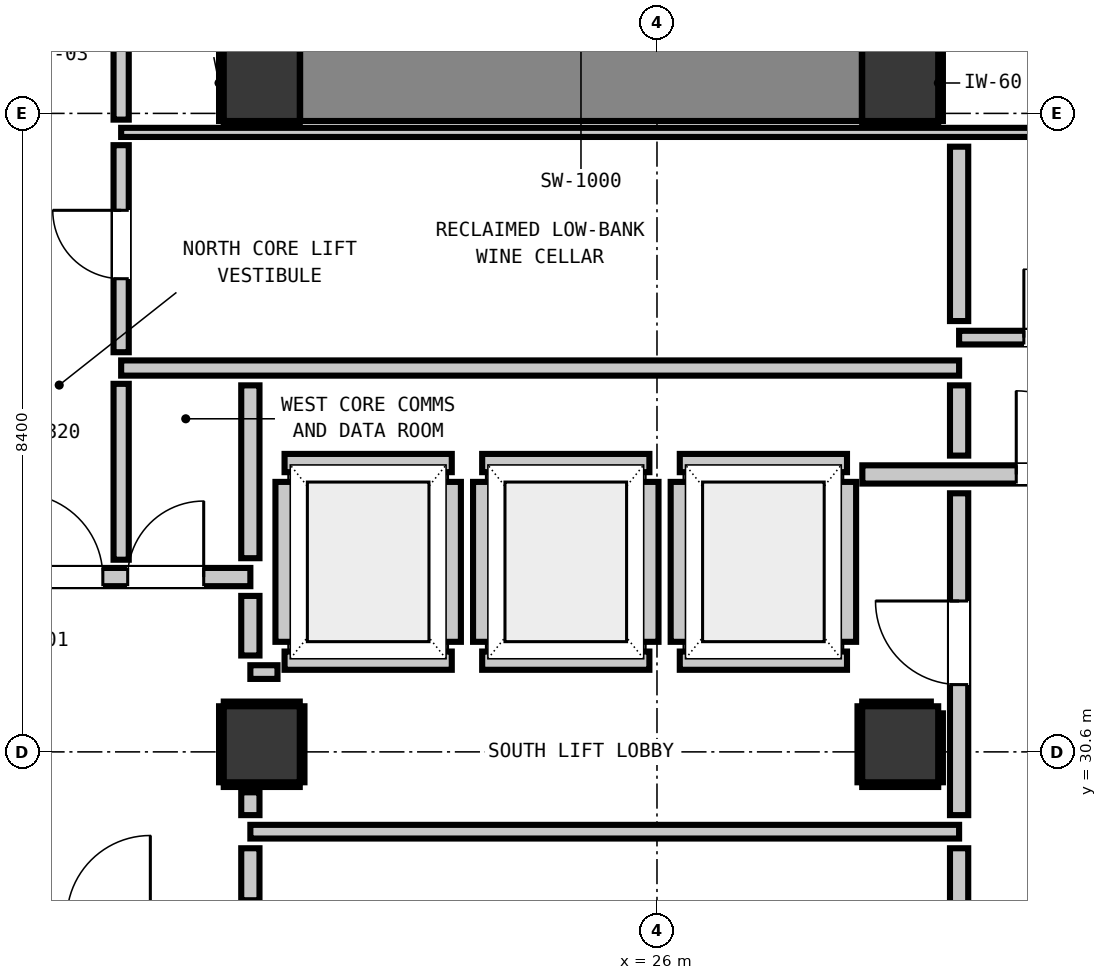
"""IFC4 building model, lengths in metres.
Left out: names, types, materials, properties, quantities, classifications, styles, units other than length and angle.
Written with IfcOpenShell. Run it as: python <this file> out.ifc"""

import sys

from ifc_helpers import new_model, si_unit, direction, frame, frame_2d, origin, origin_2d, place, context, subcontext, project, spatial, rectangle, extrude, element, fill, save


model = new_model("IFC4")
c1 = context("Model", 3, precision=1e-05, world=origin(), true_north=direction((0.0, 1.0)))
c2 = subcontext(c1, "Body", "Model", "MODEL_VIEW")
j1 = project(units=[si_unit("LENGTHUNIT", "METRE"), si_unit("PLANEANGLEUNIT", "RADIAN")], contexts=[c1])
p1 = place(None, origin())
s1 = spatial("IfcSite", under=j1, at=p1, CompositionType="ELEMENT")
p2 = place(p1, origin())
s2 = spatial("IfcBuilding", under=s1, at=p2, CompositionType="ELEMENT")
p3 = place(p2, frame((0.0, 0.0, 162.52)))
s3 = spatial("IfcBuildingStorey", under=s2, at=p3, CompositionType="ELEMENT", Elevation=162.52)
for number, where, z_axis, x_axis in (
    (1, (20.8, 39.4, 0.0), (0.0, 0.0, 1.0), (1.0, 0.0, 0.0)),
    (2, (29.2, 39.4, 0.0), (0.0, 0.0, 1.0), (1.0, 0.0, 0.0)),
):
    element("IfcColumn", number, at=place(p3, frame(where, z_axis=z_axis, x_axis=x_axis)), inside=s3, PredefinedType="COLUMN", context=c2, shape_type="SweptSolid", body=[
        extrude(rectangle(XDim=1.0, YDim=1.0, at=origin_2d()), origin(), (0.0, 0.0, 1.0), 3.32),
    ])
p4 = place(p3, frame((21.305, 39.4, 0.0), z_axis=(0.0, 0.0, 1.0), x_axis=(1.0, 0.0, 0.0)))
e3 = element("IfcWall", 3, at=p4, inside=s3, PredefinedType="SHEAR", context=c2, shape_type="SweptSolid", body=[
    extrude(rectangle(XDim=7.39, YDim=1.0, at=frame_2d((3.695, 0.0))), origin(), (0.0, 0.0, 1.0), 3.32),
])
for number, where, z_axis, x_axis in (
    (4, (20.8, 30.7, 0.0), (0.0, 0.0, 1.0), (1.0, 0.0, 0.0)),
    (5, (29.2, 30.7, 0.0), (0.0, 0.0, 1.0), (1.0, 0.0, 0.0)),
):
    element("IfcColumn", number, at=place(p3, frame(where, z_axis=z_axis, x_axis=x_axis)), inside=s3, PredefinedType="COLUMN", context=c2, shape_type="SweptSolid", body=[
        extrude(rectangle(XDim=1.0, YDim=1.0, at=origin_2d()), origin(), (0.0, 0.0, 1.0), 3.32),
    ])
for number, where, z_axis, x_axis in (
    (6, (21.1, 31.8, 0.0), (0.0, 0.0, 1.0), (1.0, 0.0, 0.0)),
    (7, (21.1, 34.4, 0.0), (0.0, 0.0, 1.0), (1.0, 0.0, 0.0)),
):
    element("IfcWall", number, at=place(p3, frame(where, z_axis=z_axis, x_axis=x_axis)), inside=s3, PredefinedType="PARTITIONING", context=c2, shape_type="SweptSolid", body=[
        extrude(rectangle(XDim=2.2, YDim=0.24, at=frame_2d((1.1, 0.0))), origin(), (0.0, 0.0, 1.0), 2.9),
    ])
p5 = place(p3, frame((21.1, 32.048, 0.0), z_axis=(0.0, 0.0, 1.0), x_axis=(0.0, 1.0, 0.0)))
e8 = element("IfcWall", 8, at=p5, inside=s3, PredefinedType="PARTITIONING", context=c2, shape_type="SweptSolid", body=[
    extrude(rectangle(XDim=2.104, YDim=0.24, at=frame_2d((1.052, 0.0))), origin(), (0.0, 0.0, 1.0), 0.905),
])
p6 = place(p3, frame((23.3, 32.048, 0.0), z_axis=(0.0, 0.0, 1.0), x_axis=(0.0, 1.0, 0.0)))
e9 = element("IfcWall", 9, at=p6, inside=s3, PredefinedType="PARTITIONING", context=c2, shape_type="SweptSolid", body=[
    extrude(rectangle(XDim=2.104, YDim=0.24, at=frame_2d((1.052, 0.0))), origin(), (0.0, 0.0, 1.0), 2.9),
])
for number, where, z_axis, x_axis in (
    (10, (23.7, 31.8, 0.0), (0.0, 0.0, 1.0), (1.0, 0.0, 0.0)),
    (11, (23.7, 34.4, 0.0), (0.0, 0.0, 1.0), (1.0, 0.0, 0.0)),
):
    element("IfcWall", number, at=place(p3, frame(where, z_axis=z_axis, x_axis=x_axis)), inside=s3, PredefinedType="PARTITIONING", context=c2, shape_type="SweptSolid", body=[
        extrude(rectangle(XDim=2.2, YDim=0.24, at=frame_2d((1.1, 0.0))), origin(), (0.0, 0.0, 1.0), 2.9),
    ])
for number, where, z_axis, x_axis in (
    (12, (23.7, 32.048, 0.0), (0.0, 0.0, 1.0), (0.0, 1.0, 0.0)),
    (13, (25.9, 32.048, 0.0), (0.0, 0.0, 1.0), (0.0, 1.0, 0.0)),
):
    element("IfcWall", number, at=place(p3, frame(where, z_axis=z_axis, x_axis=x_axis)), inside=s3, PredefinedType="PARTITIONING", context=c2, shape_type="SweptSolid", body=[
        extrude(rectangle(XDim=2.104, YDim=0.24, at=frame_2d((1.052, 0.0))), origin(), (0.0, 0.0, 1.0), 2.9),
    ])
for number, where, z_axis, x_axis in (
    (14, (26.3, 31.8, 0.0), (0.0, 0.0, 1.0), (1.0, 0.0, 0.0)),
    (15, (26.3, 34.4, 0.0), (0.0, 0.0, 1.0), (1.0, 0.0, 0.0)),
):
    element("IfcWall", number, at=place(p3, frame(where, z_axis=z_axis, x_axis=x_axis)), inside=s3, PredefinedType="PARTITIONING", context=c2, shape_type="SweptSolid", body=[
        extrude(rectangle(XDim=2.2, YDim=0.24, at=frame_2d((1.1, 0.0))), origin(), (0.0, 0.0, 1.0), 2.9),
    ])
p7 = place(p3, frame((26.3, 32.048, 0.0), z_axis=(0.0, 0.0, 1.0), x_axis=(0.0, 1.0, 0.0)))
e16 = element("IfcWall", 16, at=p7, inside=s3, PredefinedType="PARTITIONING", context=c2, shape_type="SweptSolid", body=[
    extrude(rectangle(XDim=2.104, YDim=0.24, at=frame_2d((1.052, 0.0))), origin(), (0.0, 0.0, 1.0), 2.9),
])
p8 = place(p3, frame((28.5, 32.048, 0.0), z_axis=(0.0, 0.0, 1.0), x_axis=(0.0, 1.0, 0.0)))
e17 = element("IfcWall", 17, at=p8, inside=s3, PredefinedType="PARTITIONING", context=c2, shape_type="SweptSolid", body=[
    extrude(rectangle(XDim=2.104, YDim=0.24, at=frame_2d((1.052, 0.0))), origin(), (0.0, 0.0, 1.0), 0.905),
])
p9 = place(p3, frame((17.45, 32.9, 0.0), z_axis=(0.0, 0.0, 1.0), x_axis=(1.0, 0.0, 0.0)))
e18 = element("IfcWall", 18, at=p9, inside=s3, PredefinedType="PARTITIONING", context=c2, shape_type="SweptSolid", body=[
    extrude(rectangle(XDim=3.2, YDim=0.24, at=frame_2d((1.6, 0.0))), origin(), (0.0, 0.0, 1.0), 2.9),
])
p10 = place(p9, frame((0.159, 0.0, 0.0)))
e19 = element("IfcOpeningElement", 19, at=p10, cuts=e18, PredefinedType="OPENING", context=c2, shape_type="SweptSolid", body=[
    extrude(rectangle(XDim=1.1, YDim=2.15, at=frame_2d((0.55, 1.075))), frame((0.0, 0.13, 0.0), z_axis=(0.0, -1.0, 0.0), x_axis=(1.0, 0.0, 0.0)), (0.0, 0.0, 1.0), 0.26),
])
p11 = place(p9, frame((1.586, 0.0, 0.0)))
e20 = element("IfcOpeningElement", 20, at=p11, cuts=e18, PredefinedType="OPENING", context=c2, shape_type="SweptSolid", body=[
    extrude(rectangle(XDim=1.0, YDim=2.15, at=frame_2d((0.5, 1.075))), frame((0.0, 0.13, 0.0), z_axis=(0.0, -1.0, 0.0), x_axis=(1.0, 0.0, 0.0)), (0.0, 0.0, 1.0), 0.26),
])
p12 = place(p3, frame((28.702, 34.25, 0.0), z_axis=(0.0, 0.0, 1.0), x_axis=(1.0, 0.0, 0.0)))
e21 = element("IfcWall", 21, at=p12, inside=s3, PredefinedType="PARTITIONING", context=c2, shape_type="SweptSolid", body=[
    extrude(rectangle(XDim=3.748, YDim=0.24, at=frame_2d((1.874, 0.0))), origin(), (0.0, 0.0, 1.0), 2.9),
])
p13 = place(p12, frame((2.025, 0.0, 0.0)))
e22 = element("IfcOpeningElement", 22, at=p13, cuts=e21, PredefinedType="OPENING", context=c2, shape_type="SweptSolid", body=[
    extrude(rectangle(XDim=1.1, YDim=2.15, at=frame_2d((0.55, 1.075))), frame((0.0, 0.13, 0.0), z_axis=(0.0, -1.0, 0.0), x_axis=(1.0, 0.0, 0.0)), (0.0, 0.0, 1.0), 0.26),
])
p14 = place(p3, frame((18.95, 35.65, 0.0), z_axis=(0.0, 0.0, 1.0), x_axis=(1.0, 0.0, 0.0)))
e23 = element("IfcWall", 23, at=p14, inside=s3, PredefinedType="PARTITIONING", context=c2, shape_type="SweptSolid", body=[
    extrude(rectangle(XDim=11.025, YDim=0.2, at=frame_2d((5.513, 0.0))), origin(), (0.0, 0.0, 1.0), 2.9),
])
p15 = place(p3, frame((20.65, 29.55, 0.0), z_axis=(0.0, 0.0, 1.0), x_axis=(1.0, 0.0, 0.0)))
e24 = element("IfcWall", 24, at=p15, inside=s3, PredefinedType="PARTITIONING", context=c2, shape_type="SweptSolid", body=[
    extrude(rectangle(XDim=9.325, YDim=0.18, at=frame_2d((4.663, 0.0))), origin(), (0.0, 0.0, 1.0), 2.9),
])
p16 = place(p3, frame((20.65, 31.65, 0.0), z_axis=(0.0, 0.0, 1.0), x_axis=(1.0, 0.0, 0.0)))
e25 = element("IfcWall", 25, at=p16, inside=s3, PredefinedType="PARTITIONING", context=c2, shape_type="SweptSolid", body=[
    extrude(rectangle(XDim=0.357, YDim=0.18, at=frame_2d((0.179, 0.0))), origin(), (0.0, 0.0, 1.0), 2.9),
])
p17 = place(p3, frame((29.975, 36.05, 0.0), z_axis=(0.0, 0.0, 1.0), x_axis=(1.0, 0.0, 0.0)))
e26 = element("IfcWall", 26, at=p17, inside=s3, PredefinedType="PARTITIONING", context=c2, shape_type="SweptSolid", body=[
    extrude(rectangle(XDim=2.505, YDim=0.18, at=frame_2d((1.252, 0.0))), origin(), (0.0, 0.0, 1.0), 2.9),
])
p18 = place(p17, frame((0.852, 0.0, 0.0)))
e27 = element("IfcOpeningElement", 27, at=p18, cuts=e26, PredefinedType="OPENING", context=c2, shape_type="SweptSolid", body=[
    extrude(rectangle(XDim=0.9, YDim=2.1, at=frame_2d((0.45, 1.05))), frame((0.0, 0.1, 0.0), z_axis=(0.0, -1.0, 0.0), x_axis=(1.0, 0.0, 0.0)), (0.0, 0.0, 1.0), 0.2),
])
p19 = place(p3, frame((18.95, 38.75, 0.0), z_axis=(0.0, 0.0, 1.0), x_axis=(1.0, 0.0, 0.0)))
e28 = element("IfcWall", 28, at=p19, inside=s3, PredefinedType="PARTITIONING", context=c2, shape_type="SweptSolid", body=[
    extrude(rectangle(XDim=13.56, YDim=0.12, at=frame_2d((6.78, 0.0))), origin(), (0.0, 0.0, 1.0), 0.905),
])
p20 = place(p3, frame((20.65, 28.648, 0.0), z_axis=(0.0, 0.0, 1.0), x_axis=(0.0, 1.0, 0.0)))
e29 = element("IfcWall", 29, at=p20, inside=s3, PredefinedType="PARTITIONING", context=c2, shape_type="SweptSolid", body=[
    extrude(rectangle(XDim=0.684, YDim=0.24, at=frame_2d((0.342, 0.0))), origin(), (0.0, 0.0, 1.0), 0.905),
])
p21 = place(p3, frame((20.65, 29.768, 0.0), z_axis=(0.0, 0.0, 1.0), x_axis=(0.0, 1.0, 0.0)))
e30 = element("IfcWall", 30, at=p21, inside=s3, PredefinedType="PARTITIONING", context=c2, shape_type="SweptSolid", body=[
    extrude(rectangle(XDim=0.3, YDim=0.24, at=frame_2d((0.15, 0.0))), origin(), (0.0, 0.0, 1.0), 0.905),
])
p22 = place(p3, frame((20.65, 31.868, 0.0), z_axis=(0.0, 0.0, 1.0), x_axis=(0.0, 1.0, 0.0)))
e31 = element("IfcWall", 31, at=p22, inside=s3, PredefinedType="PARTITIONING", context=c2, shape_type="SweptSolid", body=[
    extrude(rectangle(XDim=0.784, YDim=0.24, at=frame_2d((0.392, 0.0))), origin(), (0.0, 0.0, 1.0), 0.905),
])
p23 = place(p3, frame((20.65, 33.148, 0.0), z_axis=(0.0, 0.0, 1.0), x_axis=(0.0, 1.0, 0.0)))
e32 = element("IfcWall", 32, at=p23, inside=s3, PredefinedType="PARTITIONING", context=c2, shape_type="SweptSolid", body=[
    extrude(rectangle(XDim=2.274, YDim=0.24, at=frame_2d((1.137, 0.0))), origin(), (0.0, 0.0, 1.0), 0.905),
])
p24 = place(p3, frame((29.975, 25.648, 0.0), z_axis=(0.0, 0.0, 1.0), x_axis=(0.0, 1.0, 0.0)))
e33 = element("IfcWall", 33, at=p24, inside=s3, PredefinedType="PARTITIONING", context=c2, shape_type="SweptSolid", body=[
    extrude(rectangle(XDim=3.684, YDim=0.24, at=frame_2d((1.842, 0.0))), origin(), (0.0, 0.0, 1.0), 2.9),
])
p25 = place(p3, frame((29.975, 29.768, 0.0), z_axis=(0.0, 0.0, 1.0), x_axis=(0.0, 1.0, 0.0)))
e34 = element("IfcWall", 34, at=p25, inside=s3, PredefinedType="PARTITIONING", context=c2, shape_type="SweptSolid", body=[
    extrude(rectangle(XDim=4.234, YDim=0.24, at=frame_2d((2.117, 0.0))), origin(), (0.0, 0.0, 1.0), 2.9),
])
p26 = place(p25, frame((1.717, 0.0, 0.0)))
e35 = element("IfcOpeningElement", 35, at=p26, cuts=e34, PredefinedType="OPENING", context=c2, shape_type="SweptSolid", body=[
    extrude(rectangle(XDim=1.1, YDim=2.15, at=frame_2d((0.55, 1.075))), frame((0.0, 0.13, 0.0), z_axis=(0.0, -1.0, 0.0), x_axis=(1.0, 0.0, 0.0)), (0.0, 0.0, 1.0), 0.26),
])
p27 = place(p3, frame((29.975, 34.498, 0.0), z_axis=(0.0, 0.0, 1.0), x_axis=(0.0, 1.0, 0.0)))
e36 = element("IfcWall", 36, at=p27, inside=s3, PredefinedType="PARTITIONING", context=c2, shape_type="SweptSolid", body=[
    extrude(rectangle(XDim=0.924, YDim=0.24, at=frame_2d((0.462, 0.0))), origin(), (0.0, 0.0, 1.0), 2.9),
])
p28 = place(p3, frame((29.975, 36.268, 0.0), z_axis=(0.0, 0.0, 1.0), x_axis=(0.0, 1.0, 0.0)))
e37 = element("IfcWall", 37, at=p28, inside=s3, PredefinedType="PARTITIONING", context=c2, shape_type="SweptSolid", body=[
    extrude(rectangle(XDim=2.294, YDim=0.24, at=frame_2d((1.147, 0.0))), origin(), (0.0, 0.0, 1.0), 2.9),
])
p29 = place(p3, frame((18.95, 33.128, 0.0), z_axis=(0.0, 0.0, 1.0), x_axis=(0.0, 1.0, 0.0)))
e38 = element("IfcWall", 38, at=p29, inside=s3, PredefinedType="PARTITIONING", context=c2, shape_type="SweptSolid", body=[
    extrude(rectangle(XDim=2.314, YDim=0.2, at=frame_2d((1.157, 0.0))), origin(), (0.0, 0.0, 1.0), 2.9),
])
p30 = place(p3, frame((18.95, 35.858, 0.0), z_axis=(0.0, 0.0, 1.0), x_axis=(0.0, 1.0, 0.0)))
e39 = element("IfcWall", 39, at=p30, inside=s3, PredefinedType="PARTITIONING", context=c2, shape_type="SweptSolid", body=[
    extrude(rectangle(XDim=2.724, YDim=0.2, at=frame_2d((1.362, 0.0))), origin(), (0.0, 0.0, 1.0), 2.9),
])
p31 = place(p30, frame((0.967, 0.0, 0.0)))
e40 = element("IfcOpeningElement", 40, at=p31, cuts=e39, PredefinedType="OPENING", context=c2, shape_type="SweptSolid", body=[
    extrude(rectangle(XDim=0.9, YDim=2.1, at=frame_2d((0.45, 1.05))), frame((0.0, 0.11, 0.0), z_axis=(0.0, -1.0, 0.0), x_axis=(1.0, 0.0, 0.0)), (0.0, 0.0, 1.0), 0.22),
])
p32 = place(p3, frame((18.95, 38.918, 0.0), z_axis=(0.0, 0.0, 1.0), x_axis=(0.0, 1.0, 0.0)))
e41 = element("IfcWall", 41, at=p32, inside=s3, PredefinedType="PARTITIONING", context=c2, shape_type="SweptSolid", body=[
    extrude(rectangle(XDim=1.134, YDim=0.2, at=frame_2d((0.567, 0.0))), origin(), (0.0, 0.0, 1.0), 2.9),
])
for number, where, z_axis, x_axis in (
    (42, (20.3, 38.868, 0.0), (0.0, 0.0, 1.0), (1.0, 0.0, 0.0)),
    (43, (20.268, 38.9, 0.0), (0.0, 0.0, 1.0), (0.0, 1.0, 0.0)),
    (44, (28.7, 38.868, 0.0), (0.0, 0.0, 1.0), (1.0, 0.0, 0.0)),
    (45, (29.732, 38.9, 0.0), (0.0, 0.0, 1.0), (0.0, 1.0, 0.0)),
    (46, (20.3, 30.168, 0.0), (0.0, 0.0, 1.0), (1.0, 0.0, 0.0)),
    (47, (20.3, 31.232, 0.0), (0.0, 0.0, 1.0), (1.0, 0.0, 0.0)),
    (48, (20.268, 30.2, 0.0), (0.0, 0.0, 1.0), (0.0, 1.0, 0.0)),
    (49, (21.332, 30.2, 0.0), (0.0, 0.0, 1.0), (0.0, 1.0, 0.0)),
    (50, (28.7, 30.168, 0.0), (0.0, 0.0, 1.0), (1.0, 0.0, 0.0)),
):
    element("IfcWall", number, at=place(p3, frame(where, z_axis=z_axis, x_axis=x_axis)), inside=s3, PredefinedType="PARTITIONING", context=c2, shape_type="SweptSolid", body=[
        extrude(rectangle(XDim=1.0, YDim=0.06, at=frame_2d((0.5, 0.0))), origin(), (0.0, 0.0, 1.0), 0.905),
    ])
p33 = place(p3, frame((28.7, 31.232, 0.0), z_axis=(0.0, 0.0, 1.0), x_axis=(1.0, 0.0, 0.0)))
e51 = element("IfcWall", 51, at=p33, inside=s3, PredefinedType="PARTITIONING", context=c2, shape_type="SweptSolid", body=[
    extrude(rectangle(XDim=0.903, YDim=0.06, at=frame_2d((0.452, 0.0))), origin(), (0.0, 0.0, 1.0), 0.905),
])
p34 = place(p3, frame((28.668, 30.2, 0.0), z_axis=(0.0, 0.0, 1.0), x_axis=(0.0, 1.0, 0.0)))
e52 = element("IfcWall", 52, at=p34, inside=s3, PredefinedType="PARTITIONING", context=c2, shape_type="SweptSolid", body=[
    extrude(rectangle(XDim=1.0, YDim=0.06, at=frame_2d((0.5, 0.0))), origin(), (0.0, 0.0, 1.0), 0.905),
])
p35 = place(p3, frame((29.732, 30.2, 0.0), z_axis=(0.0, 0.0, 1.0), x_axis=(0.0, 1.0, 0.0)))
e53 = element("IfcWall", 53, at=p35, inside=s3, PredefinedType="PARTITIONING", context=c2, shape_type="SweptSolid", body=[
    extrude(rectangle(XDim=0.907, YDim=0.06, at=frame_2d((0.454, 0.0))), origin(), (0.0, 0.0, 1.0), 0.905),
])
p36 = place(p10, origin())
e54 = element("IfcDoor", 54, at=p36, inside=s3, OperationType="SINGLE_SWING_LEFT", PredefinedType="DOOR", context=c2, shape_type="SweptSolid", body=[
    extrude(rectangle(XDim=1.1, YDim=2.15, at=frame_2d((0.55, 1.075))), frame((0.0, 0.025, 0.0), z_axis=(0.0, -1.0, 0.0), x_axis=(1.0, 0.0, 0.0)), (0.0, 0.0, 1.0), 0.05),
])
fill(e19, e54)
p37 = place(p26, origin())
e55 = element("IfcDoor", 55, at=p37, inside=s3, OperationType="SINGLE_SWING_RIGHT", PredefinedType="DOOR", context=c2, shape_type="SweptSolid", body=[
    extrude(rectangle(XDim=1.1, YDim=2.15, at=frame_2d((0.55, 1.075))), frame((0.0, 0.025, 0.0), z_axis=(0.0, -1.0, 0.0), x_axis=(1.0, 0.0, 0.0)), (0.0, 0.0, 1.0), 0.05),
])
fill(e35, e55)
p38 = place(p13, origin())
e56 = element("IfcDoor", 56, at=p38, inside=s3, OperationType="SINGLE_SWING_LEFT", PredefinedType="DOOR", context=c2, shape_type="SweptSolid", body=[
    extrude(rectangle(XDim=1.1, YDim=2.15, at=frame_2d((0.55, 1.075))), frame((0.0, 0.025, 0.0), z_axis=(0.0, -1.0, 0.0), x_axis=(1.0, 0.0, 0.0)), (0.0, 0.0, 1.0), 0.05),
])
fill(e22, e56)
p39 = place(p11, origin())
e57 = element("IfcDoor", 57, at=p39, inside=s3, OperationType="SINGLE_SWING_RIGHT", PredefinedType="DOOR", context=c2, shape_type="SweptSolid", body=[
    extrude(rectangle(XDim=1.0, YDim=2.15, at=frame_2d((0.5, 1.075))), frame((0.0, 0.025, 0.0), z_axis=(0.0, -1.0, 0.0), x_axis=(1.0, 0.0, 0.0)), (0.0, 0.0, 1.0), 0.05),
])
fill(e20, e57)
p40 = place(p18, origin())
e58 = element("IfcDoor", 58, at=p40, inside=s3, OperationType="SINGLE_SWING_LEFT", PredefinedType="DOOR", context=c2, shape_type="SweptSolid", body=[
    extrude(rectangle(XDim=0.9, YDim=2.1, at=frame_2d((0.45, 1.05))), frame((0.0, 0.025, 0.0), z_axis=(0.0, -1.0, 0.0), x_axis=(1.0, 0.0, 0.0)), (0.0, 0.0, 1.0), 0.05),
])
fill(e27, e58)
p41 = place(p31, origin())
e59 = element("IfcDoor", 59, at=p41, inside=s3, OperationType="SINGLE_SWING_RIGHT", PredefinedType="DOOR", context=c2, shape_type="SweptSolid", body=[
    extrude(rectangle(XDim=0.9, YDim=2.1, at=frame_2d((0.45, 1.05))), frame((0.0, 0.025, 0.0), z_axis=(0.0, -1.0, 0.0), x_axis=(1.0, 0.0, 0.0)), (0.0, 0.0, 1.0), 0.05),
])
fill(e40, e59)
save(model, sys.argv[1])
